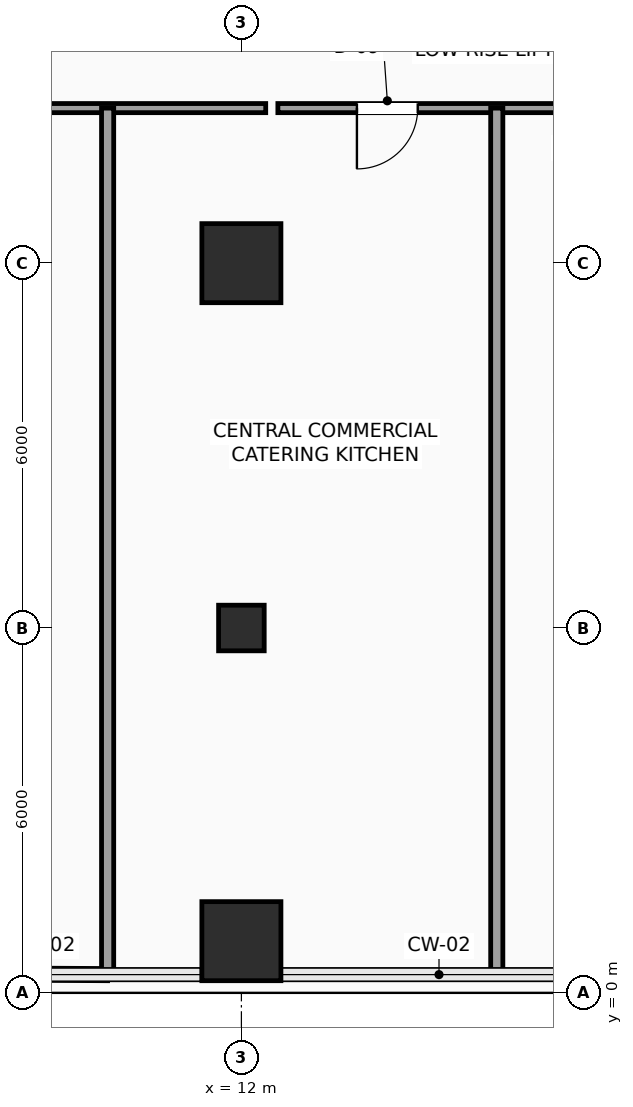
"""IFC4 building model, lengths in metres.
Left out: names, types, materials, properties, quantities, classifications, styles, units other than length and angle.
Written with IfcOpenShell. Run it as: python <this file> out.ifc"""

import sys

from ifc_helpers import new_model, si_unit, direction, frame, frame_2d, origin, origin_2d, place, context, subcontext, project, spatial, rectangle, hollow_rectangle, extrude, element, fill, save


model = new_model("IFC4")
c1 = context("Model", 3, precision=1e-05, world=origin(), true_north=direction((0.0, 1.0)))
c2 = subcontext(c1, "Body", "Model", "MODEL_VIEW")
j1 = project(units=[si_unit("LENGTHUNIT", "METRE"), si_unit("PLANEANGLEUNIT", "RADIAN")], contexts=[c1])
p1 = place(None, origin())
s1 = spatial("IfcSite", under=j1, at=p1, CompositionType="ELEMENT")
p2 = place(p1, origin())
s2 = spatial("IfcBuilding", under=s1, at=p2, CompositionType="ELEMENT")
p3 = place(p2, frame((0.0, 0.0, 71.4)))
s3 = spatial("IfcBuildingStorey", under=s2, at=p3, CompositionType="ELEMENT", Elevation=71.4)
p4 = place(p3, frame((12.0, 0.85, 0.0), z_axis=(0.0, 0.0, 1.0), x_axis=(1.0, 0.0, 0.0)))
e1 = element("IfcColumn", 1, at=p4, inside=s3, PredefinedType="COLUMN", context=c2, shape_type="SweptSolid", body=[
    extrude(rectangle(XDim=1.3, YDim=1.3, at=origin_2d()), origin(), (0.0, 0.0, 1.0), 3.9),
])
p5 = place(p3, frame((12.0, 6.0, 0.0), z_axis=(0.0, 0.0, 1.0), x_axis=(1.0, 0.0, 0.0)))
e2 = element("IfcColumn", 2, at=p5, inside=s3, PredefinedType="COLUMN", context=c2, shape_type="SweptSolid", body=[
    extrude(hollow_rectangle(XDim=0.75, YDim=0.75, WallThickness=0.035, InnerFilletRadius=0.035, OuterFilletRadius=0.05, at=origin_2d()), origin(), (0.0, 0.0, 1.0), 3.9),
])
p6 = place(p3, frame((12.0, 12.0, 0.0), z_axis=(0.0, 0.0, 1.0), x_axis=(1.0, 0.0, 0.0)))
e3 = element("IfcColumn", 3, at=p6, inside=s3, PredefinedType="COLUMN", context=c2, shape_type="SweptSolid", body=[
    extrude(rectangle(XDim=1.3, YDim=1.3, at=origin_2d()), origin(), (0.0, 0.0, 1.0), 3.9),
])
p7 = place(p3, frame((21.55, 14.55, 0.0), z_axis=(0.0, 0.0, 1.0), x_axis=(-1.0, 0.0, 0.0)))
e4 = element("IfcWall", 4, at=p7, inside=s3, PredefinedType="PARTITIONING", context=c2, shape_type="SweptSolid", body=[
    extrude(rectangle(XDim=8.95, YDim=0.15, at=frame_2d((4.475, 0.0))), origin(), (0.0, 0.0, 1.0), 3.65),
])
p8 = place(p7, frame((6.65, 0.0, 0.0)))
e5 = element("IfcOpeningElement", 5, at=p8, cuts=e4, PredefinedType="OPENING", context=c2, shape_type="SweptSolid", body=[
    extrude(rectangle(XDim=1.0, YDim=2.2, at=frame_2d((0.5, 1.1))), frame((0.0, 0.085, 0.0), z_axis=(0.0, -1.0, 0.0), x_axis=(1.0, 0.0, 0.0)), (0.0, 0.0, 1.0), 0.17),
])
p9 = place(p7, frame((2.175, 0.0, 0.0)))
e6 = element("IfcOpeningElement", 6, at=p9, cuts=e4, PredefinedType="OPENING", context=c2, shape_type="SweptSolid", body=[
    extrude(rectangle(XDim=1.0, YDim=2.2, at=frame_2d((0.5, 1.1))), frame((0.0, 0.085, 0.0), z_axis=(0.0, -1.0, 0.0), x_axis=(1.0, 0.0, 0.0)), (0.0, 0.0, 1.0), 0.17),
])
p10 = place(p3, frame((12.4, 14.55, 0.0), z_axis=(0.0, 0.0, 1.0), x_axis=(-1.0, 0.0, 0.0)))
e7 = element("IfcWall", 7, at=p10, inside=s3, PredefinedType="PARTITIONING", context=c2, shape_type="SweptSolid", body=[
    extrude(rectangle(XDim=7.15, YDim=0.15, at=frame_2d((3.575, 0.0))), origin(), (0.0, 0.0, 1.0), 3.65),
])
p11 = place(p10, frame((4.375, 0.0, 0.0)))
e8 = element("IfcOpeningElement", 8, at=p11, cuts=e7, PredefinedType="OPENING", context=c2, shape_type="SweptSolid", body=[
    extrude(rectangle(XDim=1.0, YDim=2.2, at=frame_2d((0.5, 1.1))), frame((0.0, 0.085, 0.0), z_axis=(0.0, -1.0, 0.0), x_axis=(1.0, 0.0, 0.0)), (0.0, 0.0, 1.0), 0.17),
])
p12 = place(p3, frame((6.215, 0.319, 0.0), z_axis=(0.0, 0.0, 1.0), x_axis=(0.999985892136, -0.005311829174, 0.0)))
e9 = element("IfcWall", 9, at=p12, inside=s3, PredefinedType="PARTITIONING", context=c2, shape_type="SweptSolid", body=[
    extrude(rectangle(XDim=3.585, YDim=0.2, at=frame_2d((1.792, 0.0))), origin(), (0.0, 0.0, 1.0), 3.65),
])
for number, where, z_axis, x_axis in (
    (10, (9.8, 0.3, 0.0), (0.0, 0.0, 1.0), (0.0, 1.0, 0.0)),
    (11, (16.2, 0.3, 0.0), (0.0, 0.0, 1.0), (0.0, 1.0, 0.0)),
):
    element("IfcWall", number, at=place(p3, frame(where, z_axis=z_axis, x_axis=x_axis)), inside=s3, PredefinedType="PARTITIONING", context=c2, shape_type="SweptSolid", body=[
        extrude(rectangle(XDim=14.25, YDim=0.2, at=frame_2d((7.125, 0.0))), origin(), (0.0, 0.0, 1.0), 3.65),
    ])
p13 = place(p8, origin())
e12 = element("IfcDoor", 12, at=p13, inside=s3, OperationType="SINGLE_SWING_RIGHT", PredefinedType="DOOR", context=c2, shape_type="SweptSolid", body=[
    extrude(rectangle(XDim=1.0, YDim=2.2, at=frame_2d((0.5, 1.1))), frame((0.0, 0.025, 0.0), z_axis=(0.0, -1.0, 0.0), x_axis=(1.0, 0.0, 0.0)), (0.0, 0.0, 1.0), 0.05),
])
fill(e5, e12)
save(model, sys.argv[1])
